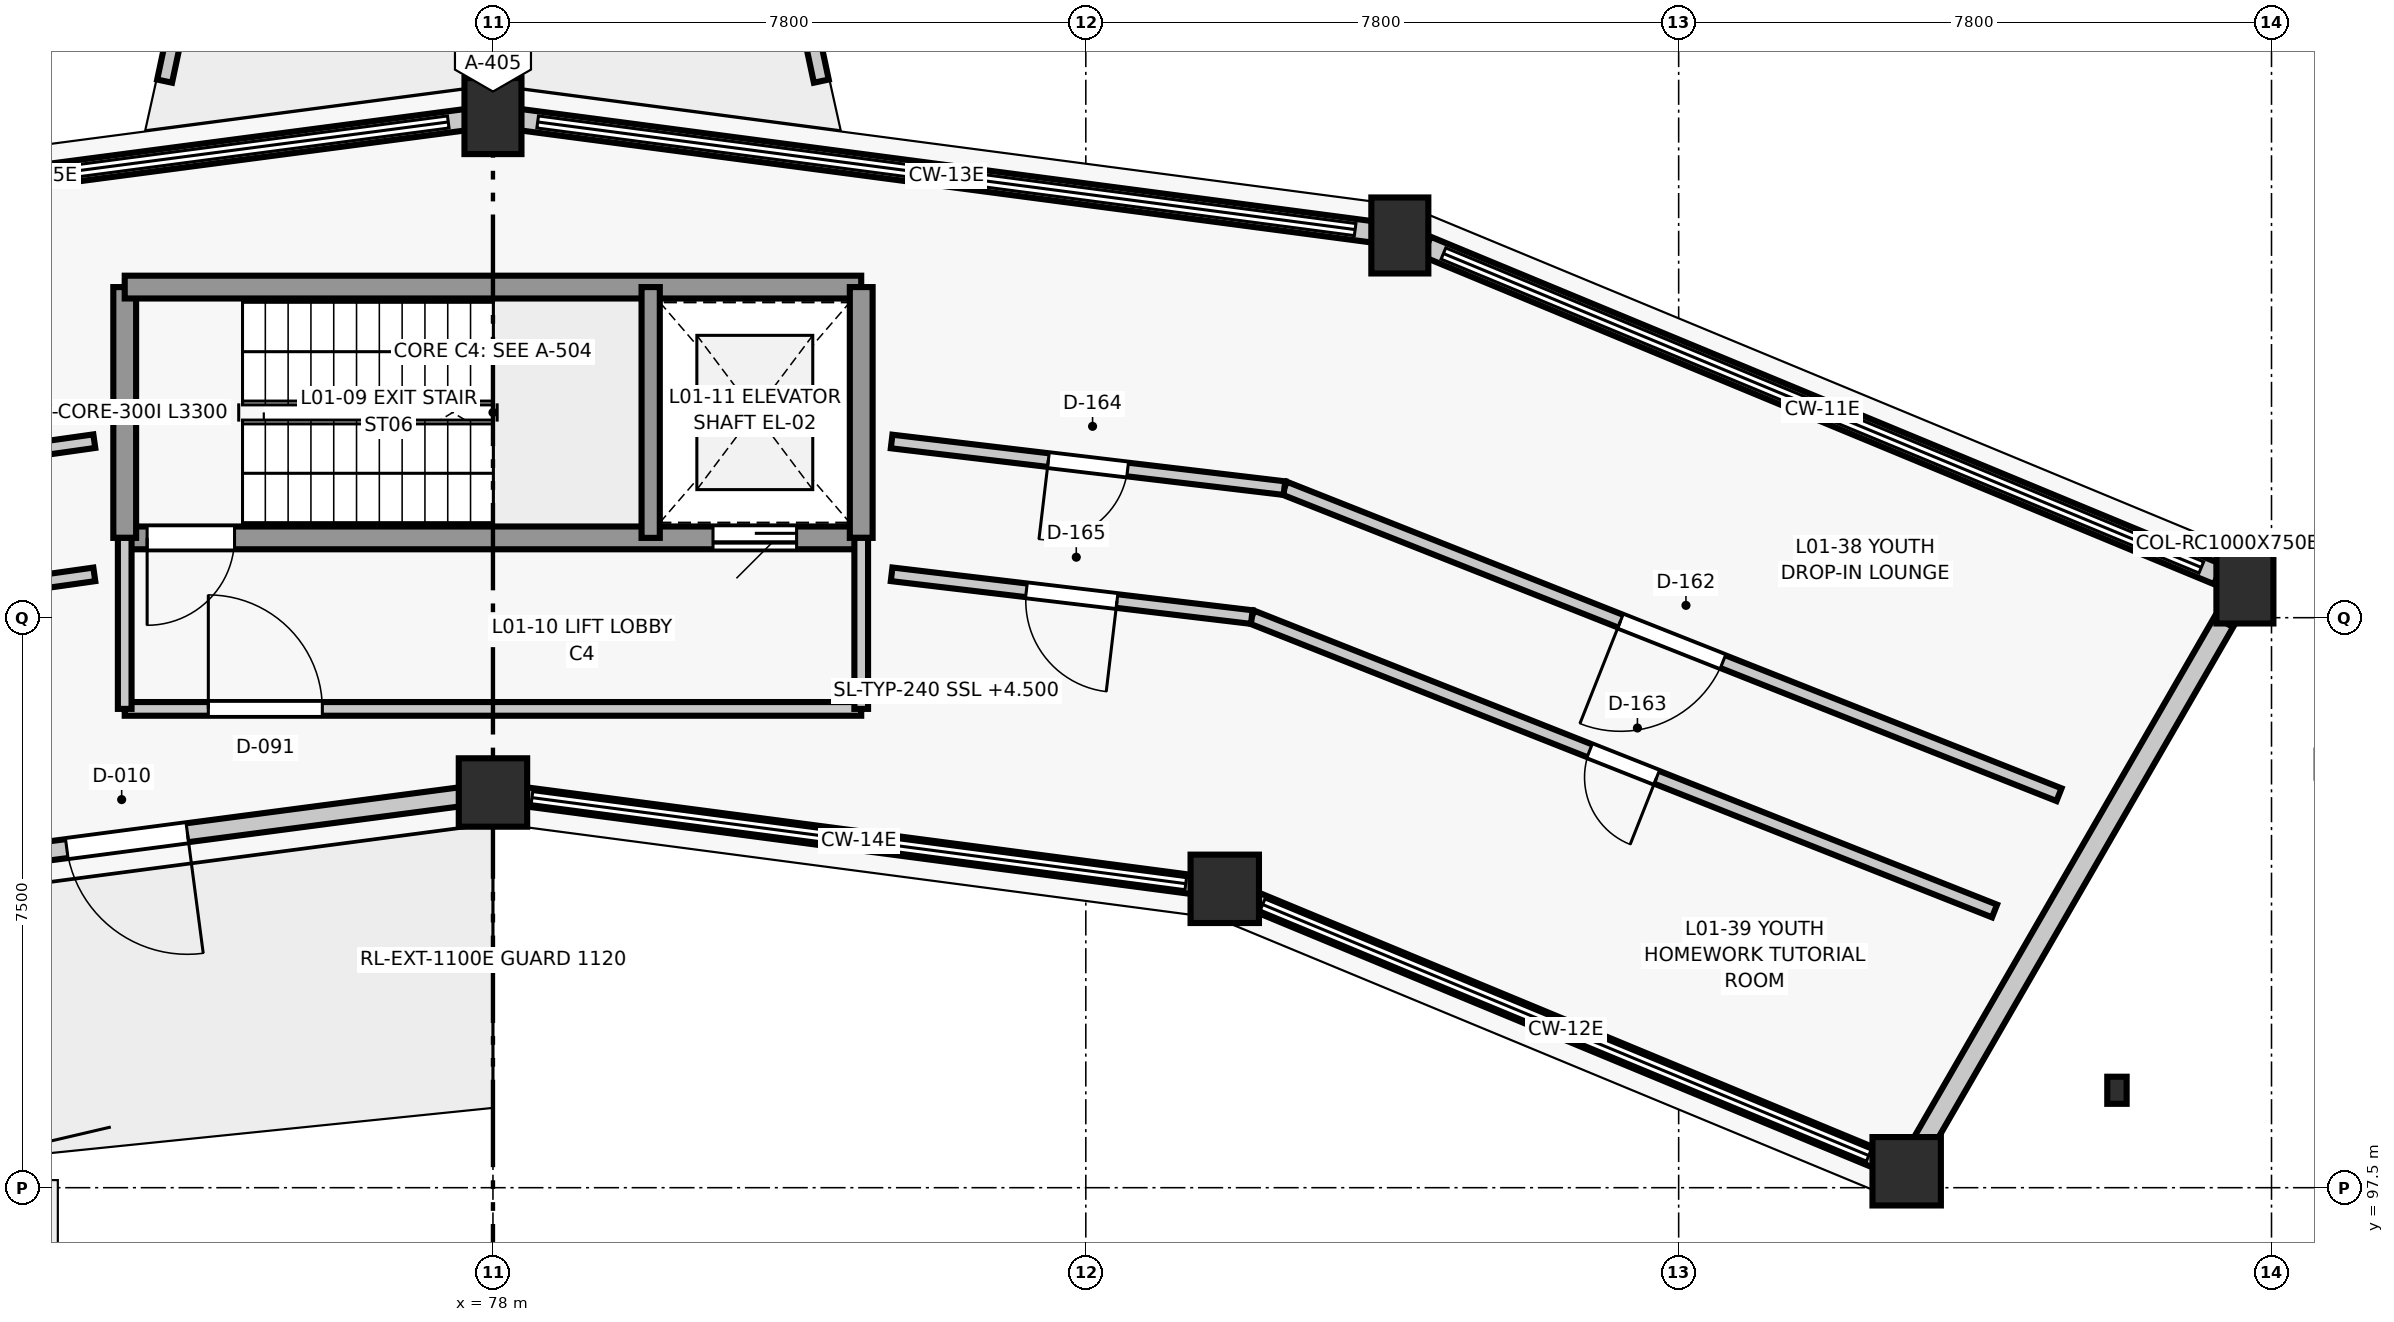
"""IFC4 building model, lengths in metres.
Left out: names, types, materials, properties, quantities, classifications, styles, units other than length and angle.
Written with IfcOpenShell. Run it as: python <this file> out.ifc"""

import sys

from ifc_helpers import new_model, si_unit, direction, frame, frame_2d, origin, origin_2d, place, context, subcontext, project, spatial, rectangle, circle, i_section, extrude, element, fill, save


model = new_model("IFC4")
c1 = context("Model", 3, precision=1e-05, world=origin(), true_north=direction((0.0, 1.0)))
c2 = subcontext(c1, "Body", "Model", "MODEL_VIEW")
j1 = project(units=[si_unit("LENGTHUNIT", "METRE"), si_unit("PLANEANGLEUNIT", "RADIAN")], contexts=[c1])
p1 = place(None, origin())
s1 = spatial("IfcSite", under=j1, at=p1, CompositionType="ELEMENT")
p2 = place(p1, origin())
s2 = spatial("IfcBuilding", under=s1, at=p2, CompositionType="ELEMENT")
p3 = place(p2, frame((0.0, 0.0, 4.5)))
s3 = spatial("IfcBuildingStorey", under=s2, at=p3, CompositionType="ELEMENT", Elevation=4.5)
for number, where, z_axis, x_axis in (
    (1, (96.6, 97.716, 0.0), (0.0, 0.0, 1.0), (1.0, 0.0, 0.0)),
    (2, (87.628, 101.432, 0.0), (0.0, 0.0, 1.0), (1.0, 0.0, 0.0)),
    (3, (78.0, 102.7, 0.0), (0.0, 0.0, 1.0), (1.0, 0.0, 0.0)),
):
    element("IfcColumn", number, at=place(p3, frame(where, z_axis=z_axis, x_axis=x_axis)), inside=s3, PredefinedType="COLUMN", context=c2, shape_type="SweptSolid", body=[
        extrude(circle(Radius=0.45, at=origin_2d()), origin(), (0.0, 0.0, 1.0), 4.2),
    ])
for number, where, z_axis, x_axis in (
    (4, (101.05, 105.424, 0.0), (0.0, 0.0, 1.0), (1.0, 0.0, 0.0)),
    (5, (89.932, 110.029, 0.0), (0.0, 0.0, 1.0), (1.0, 0.0, 0.0)),
    (6, (78.0, 111.6, 0.0), (0.0, 0.0, 1.0), (1.0, 0.0, 0.0)),
):
    element("IfcColumn", number, at=place(p3, frame(where, z_axis=z_axis, x_axis=x_axis)), inside=s3, PredefinedType="COLUMN", context=c2, shape_type="SweptSolid", body=[
        extrude(rectangle(XDim=0.75, YDim=1.0, at=origin_2d()), origin(), (0.0, 0.0, 1.0), 4.2),
    ])
p4 = place(p3, frame((99.366, 98.782, 0.0), z_axis=(0.0, 0.0, 1.0), x_axis=(1.0, 0.0, 0.0)))
e7 = element("IfcColumn", 7, at=p4, inside=s3, PredefinedType="COLUMN", context=c2, shape_type="SweptSolid", body=[
    extrude(i_section(OverallWidth=0.255, OverallDepth=0.357, WebThickness=0.01, FlangeThickness=0.018, FilletRadius=0.015, at=origin_2d()), origin(), (0.0, 0.0, 1.0), 3.35),
])
p5 = place(p3, frame((90.283, 109.883, 0.0), z_axis=(0.0, 0.0, 1.0), x_axis=(0.923883530636, -0.382673779896, 0.0)))
e8 = element("IfcWall", 8, at=p5, inside=s3, PredefinedType="STANDARD", context=c2, shape_type="SweptSolid", body=[
    extrude(rectangle(XDim=11.272, YDim=0.28, at=frame_2d((5.636, 0.0))), origin(), (0.0, 0.0, 1.0), 0.82),
])
p6 = place(p3, frame((96.323, 97.831, 0.0), z_axis=(0.0, 0.0, 1.0), x_axis=(-0.923880324771, 0.382681519675, 0.0)))
e9 = element("IfcWall", 9, at=p6, inside=s3, PredefinedType="STANDARD", context=c2, shape_type="SweptSolid", body=[
    extrude(rectangle(XDim=9.112, YDim=0.25, at=frame_2d((4.556, 0.0))), origin(), (0.0, 0.0, 1.0), 0.82),
])
p7 = place(p3, frame((78.35, 111.554, 0.0), z_axis=(0.0, 0.0, 1.0), x_axis=(0.991443215359, -0.130538694334, 0.0)))
e10 = element("IfcWall", 10, at=p7, inside=s3, PredefinedType="STANDARD", context=c2, shape_type="SweptSolid", body=[
    extrude(rectangle(XDim=11.328, YDim=0.28, at=frame_2d((5.664, 0.0))), origin(), (0.0, 0.0, 1.0), 0.82),
])
p8 = place(p3, frame((87.353, 101.469, 0.0), z_axis=(0.0, 0.0, 1.0), x_axis=(-0.991441766434, 0.130549698469, 0.0)))
e11 = element("IfcWall", 11, at=p8, inside=s3, PredefinedType="STANDARD", context=c2, shape_type="SweptSolid", body=[
    extrude(rectangle(XDim=9.156, YDim=0.25, at=frame_2d((4.578, 0.0))), origin(), (0.0, 0.0, 1.0), 0.82),
])
p9 = place(p3, frame((66.419, 110.075, 0.0), z_axis=(0.0, 0.0, 1.0), x_axis=(0.991443215359, 0.130538694334, 0.0)))
e12 = element("IfcWall", 12, at=p9, inside=s3, PredefinedType="STANDARD", context=c2, shape_type="SweptSolid", body=[
    extrude(rectangle(XDim=11.328, YDim=0.28, at=frame_2d((5.664, 0.0))), origin(), (0.0, 0.0, 1.0), 0.82),
])
p10 = place(p3, frame((77.725, 102.664, 0.0), z_axis=(0.0, 0.0, 1.0), x_axis=(-0.991441766434, -0.130549698469, 0.0)))
e13 = element("IfcWall", 13, at=p10, inside=s3, PredefinedType="STANDARD", context=c2, shape_type="SweptSolid", body=[
    extrude(rectangle(XDim=9.156, YDim=0.25, at=frame_2d((4.578, 0.0))), origin(), (0.0, 0.0, 1.0), 3.149),
])
p11 = place(p10, frame((3.778, 0.0, 0.0)))
e14 = element("IfcOpeningElement", 14, at=p11, cuts=e13, PredefinedType="OPENING", context=c2, shape_type="SweptSolid", body=[
    extrude(rectangle(XDim=1.6, YDim=2.2, at=frame_2d((0.8, 1.1))), frame((0.0, 0.135, 0.0), z_axis=(0.0, -1.0, 0.0), x_axis=(1.0, 0.0, 0.0)), (0.0, 0.0, 1.0), 0.27),
])
p12 = place(p3, frame((100.774, 104.946, 0.0), z_axis=(0.0, 0.0, 1.0), x_axis=(-0.499969958057, -0.866042747813, 0.0)))
e15 = element("IfcWall", 15, at=p12, inside=s3, PredefinedType="STANDARD", context=c2, shape_type="SweptSolid", body=[
    extrude(rectangle(XDim=8.026, YDim=0.28, at=frame_2d((4.013, 0.0))), origin(), (0.0, 0.0, 1.0), 3.217),
])
for number, where, z_axis, x_axis in (
    (16, (73.68, 112.06, 0.0), (0.0, 0.0, 1.0), (0.208, 0.978, 0.0)),
    (17, (82.12, 113.0, 0.0), (0.0, 0.0, 1.0), (0.208, -0.978, 0.0)),
):
    element("IfcWall", number, at=place(p3, frame(where, z_axis=z_axis, x_axis=x_axis)), inside=s3, PredefinedType="PARAPET", context=c2, shape_type="SweptSolid", body=[
        extrude(rectangle(XDim=0.961, YDim=0.2, at=frame_2d((0.48, 0.0))), origin(), (0.0, 0.0, 1.0), 1.12),
    ])
p13 = place(p3, frame((82.845, 106.05, 0.0), z_axis=(0.0, 0.0, 1.0), x_axis=(-1.0, 0.0, 0.0)))
e18 = element("IfcWall", 18, at=p13, inside=s3, PredefinedType="SHEAR", context=c2, shape_type="SweptSolid", body=[
    extrude(rectangle(XDim=9.69, YDim=0.3, at=frame_2d((4.845, 0.0))), origin(), (0.0, 0.0, 1.0), 4.2),
])
p14 = place(p13, frame((8.245, 0.0, 0.0)))
e19 = element("IfcOpeningElement", 19, at=p14, cuts=e18, PredefinedType="OPENING", context=c2, shape_type="SweptSolid", body=[
    extrude(rectangle(XDim=1.15, YDim=2.15, at=frame_2d((0.575, 1.075))), frame((0.0, 0.16, 0.0), z_axis=(0.0, -1.0, 0.0), x_axis=(1.0, 0.0, 0.0)), (0.0, 0.0, 1.0), 0.32),
])
p15 = place(p13, frame((0.85, 0.0, 0.0)))
e20 = element("IfcOpeningElement", 20, at=p15, cuts=e18, PredefinedType="OPENING", context=c2, shape_type="SweptSolid", body=[
    extrude(rectangle(XDim=1.1, YDim=2.15, at=frame_2d((0.55, 1.075))), frame((0.0, 0.16, 0.0), z_axis=(0.0, -1.0, 0.0), x_axis=(1.0, 0.0, 0.0)), (0.0, 0.0, 1.0), 0.32),
])
p16 = place(p3, frame((73.155, 106.05, 0.0), z_axis=(0.0, 0.0, 1.0), x_axis=(0.0, 1.0, 0.0)))
e21 = element("IfcWall", 21, at=p16, inside=s3, PredefinedType="SHEAR", context=c2, shape_type="SweptSolid", body=[
    extrude(rectangle(XDim=3.3, YDim=0.3, at=frame_2d((1.65, 0.0))), origin(), (0.0, 0.0, 1.0), 4.2),
])
p17 = place(p3, frame((73.155, 109.35, 0.0), z_axis=(0.0, 0.0, 1.0), x_axis=(1.0, 0.0, 0.0)))
e22 = element("IfcWall", 22, at=p17, inside=s3, PredefinedType="SHEAR", context=c2, shape_type="SweptSolid", body=[
    extrude(rectangle(XDim=9.69, YDim=0.3, at=frame_2d((4.845, 0.0))), origin(), (0.0, 0.0, 1.0), 4.2),
])
p18 = place(p3, frame((82.845, 109.35, 0.0), z_axis=(0.0, 0.0, 1.0), x_axis=(0.0, -1.0, 0.0)))
e23 = element("IfcWall", 23, at=p18, inside=s3, PredefinedType="SHEAR", context=c2, shape_type="SweptSolid", body=[
    extrude(rectangle(XDim=3.3, YDim=0.3, at=frame_2d((1.65, 0.0))), origin(), (0.0, 0.0, 1.0), 4.2),
])
p19 = place(p3, frame((80.075, 106.05, 0.0), z_axis=(0.0, 0.0, 1.0), x_axis=(0.0, 1.0, 0.0)))
e24 = element("IfcWall", 24, at=p19, inside=s3, PredefinedType="SHEAR", context=c2, shape_type="SweptSolid", body=[
    extrude(rectangle(XDim=3.3, YDim=0.24, at=frame_2d((1.65, 0.0))), origin(), (0.0, 0.0, 1.0), 4.2),
])
p20 = place(p3, frame((73.155, 103.8, 0.0), z_axis=(0.0, 0.0, 1.0), x_axis=(1.0, 0.0, 0.0)))
e25 = element("IfcWall", 25, at=p20, inside=s3, PredefinedType="PARTITIONING", context=c2, shape_type="SweptSolid", body=[
    extrude(rectangle(XDim=9.69, YDim=0.18, at=frame_2d((4.845, 0.0))), origin(), (0.0, 0.0, 1.0), 3.855),
])
p21 = place(p20, frame((1.1, 0.0, 0.0)))
e26 = element("IfcOpeningElement", 26, at=p21, cuts=e25, PredefinedType="OPENING", context=c2, shape_type="SweptSolid", body=[
    extrude(rectangle(XDim=1.5, YDim=2.15, at=frame_2d((0.75, 1.075))), frame((0.0, 0.1, 0.0), z_axis=(0.0, -1.0, 0.0), x_axis=(1.0, 0.0, 0.0)), (0.0, 0.0, 1.0), 0.2),
])
for number, where, z_axis, x_axis in (
    (27, (73.155, 106.05, 0.0), (0.0, 0.0, 1.0), (0.0, -1.0, 0.0)),
    (28, (82.845, 106.05, 0.0), (0.0, 0.0, 1.0), (0.0, -1.0, 0.0)),
):
    element("IfcWall", number, at=place(p3, frame(where, z_axis=z_axis, x_axis=x_axis)), inside=s3, PredefinedType="PARTITIONING", context=c2, shape_type="SweptSolid", body=[
        extrude(rectangle(XDim=2.25, YDim=0.18, at=frame_2d((1.125, 0.0))), origin(), (0.0, 0.0, 1.0), 3.855),
    ])
p22 = place(p3, frame((98.604, 102.671, 0.0), z_axis=(0.0, 0.0, 1.0), x_axis=(-0.92984059227, 0.367962597238, 0.0)))
e29 = element("IfcWall", 29, at=p22, inside=s3, PredefinedType="PARTITIONING", context=c2, shape_type="SweptSolid", body=[
    extrude(rectangle(XDim=10.961, YDim=0.18, at=frame_2d((5.48, 0.0))), origin(), (0.0, 0.0, 1.0), 3.855),
])
p23 = place(p22, frame((4.756, 0.0, 0.0)))
e30 = element("IfcOpeningElement", 30, at=p23, cuts=e29, PredefinedType="OPENING", context=c2, shape_type="SweptSolid", body=[
    extrude(rectangle(XDim=1.45, YDim=2.2, at=frame_2d((0.725, 1.1))), frame((0.0, 0.1, 0.0), z_axis=(0.0, -1.0, 0.0), x_axis=(1.0, 0.0, 0.0)), (0.0, 0.0, 1.0), 0.2),
])
p24 = place(p3, frame((97.756, 101.141, 0.0), z_axis=(0.0, 0.0, 1.0), x_axis=(-0.92984171937, 0.367959749046, 0.0)))
e31 = element("IfcWall", 31, at=p24, inside=s3, PredefinedType="PARTITIONING", context=c2, shape_type="SweptSolid", body=[
    extrude(rectangle(XDim=10.51, YDim=0.18, at=frame_2d((5.255, 0.0))), origin(), (0.0, 0.0, 1.0), 3.855),
])
p25 = place(p24, frame((4.78, 0.0, 0.0)))
e32 = element("IfcOpeningElement", 32, at=p25, cuts=e31, PredefinedType="OPENING", context=c2, shape_type="SweptSolid", body=[
    extrude(rectangle(XDim=0.95, YDim=2.1, at=frame_2d((0.475, 1.05))), frame((0.0, 0.1, 0.0), z_axis=(0.0, -1.0, 0.0), x_axis=(1.0, 0.0, 0.0)), (0.0, 0.0, 1.0), 0.2),
])
p26 = place(p3, frame((88.413, 106.705, 0.0), z_axis=(0.0, 0.0, 1.0), x_axis=(-0.993019970185, 0.117946338706, 0.0)))
e33 = element("IfcWall", 33, at=p26, inside=s3, PredefinedType="PARTITIONING", context=c2, shape_type="SweptSolid", body=[
    extrude(rectangle(XDim=5.204, YDim=0.18, at=frame_2d((2.602, 0.0))), origin(), (0.0, 0.0, 1.0), 3.855),
])
p27 = place(p26, frame((2.077, 0.0, 0.0)))
e34 = element("IfcOpeningElement", 34, at=p27, cuts=e33, PredefinedType="OPENING", context=c2, shape_type="SweptSolid", body=[
    extrude(rectangle(XDim=1.05, YDim=2.1, at=frame_2d((0.525, 1.05))), frame((0.0, 0.1, 0.0), z_axis=(0.0, -1.0, 0.0), x_axis=(1.0, 0.0, 0.0)), (0.0, 0.0, 1.0), 0.2),
])
p28 = place(p3, frame((87.984, 105.008, 0.0), z_axis=(0.0, 0.0, 1.0), x_axis=(-0.993021837472, 0.117930616486, 0.0)))
e35 = element("IfcWall", 35, at=p28, inside=s3, PredefinedType="PARTITIONING", context=c2, shape_type="SweptSolid", body=[
    extrude(rectangle(XDim=4.772, YDim=0.18, at=frame_2d((2.386, 0.0))), origin(), (0.0, 0.0, 1.0), 3.855),
])
p29 = place(p28, frame((1.786, 0.0, 0.0)))
e36 = element("IfcOpeningElement", 36, at=p29, cuts=e35, PredefinedType="OPENING", context=c2, shape_type="SweptSolid", body=[
    extrude(rectangle(XDim=1.2, YDim=2.15, at=frame_2d((0.6, 1.075))), frame((0.0, 0.1, 0.0), z_axis=(0.0, -1.0, 0.0), x_axis=(1.0, 0.0, 0.0)), (0.0, 0.0, 1.0), 0.2),
])
p30 = place(p3, frame((72.755, 107.323, 0.0), z_axis=(0.0, 0.0, 1.0), x_axis=(-0.990158330555, -0.139951707499, 0.0)))
e37 = element("IfcWall", 37, at=p30, inside=s3, PredefinedType="PARTITIONING", context=c2, shape_type="SweptSolid", body=[
    extrude(rectangle(XDim=6.141, YDim=0.18, at=frame_2d((3.07, 0.0))), origin(), (0.0, 0.0, 1.0), 3.855),
])
p31 = place(p30, frame((2.32, 0.0, 0.0)))
e38 = element("IfcOpeningElement", 38, at=p31, cuts=e37, PredefinedType="OPENING", context=c2, shape_type="SweptSolid", body=[
    extrude(rectangle(XDim=1.5, YDim=2.15, at=frame_2d((0.75, 1.075))), frame((0.0, 0.1, 0.0), z_axis=(0.0, -1.0, 0.0), x_axis=(1.0, 0.0, 0.0)), (0.0, 0.0, 1.0), 0.2),
])
p32 = place(p3, frame((72.755, 105.57, 0.0), z_axis=(0.0, 0.0, 1.0), x_axis=(-0.990158541411, -0.13995021569, 0.0)))
e39 = element("IfcWall", 39, at=p32, inside=s3, PredefinedType="PARTITIONING", context=c2, shape_type="SweptSolid", body=[
    extrude(rectangle(XDim=5.67, YDim=0.18, at=frame_2d((2.835, 0.0))), origin(), (0.0, 0.0, 1.0), 3.855),
])
p33 = place(p32, frame((2.11, 0.0, 0.0)))
e40 = element("IfcOpeningElement", 40, at=p33, cuts=e39, PredefinedType="OPENING", context=c2, shape_type="SweptSolid", body=[
    extrude(rectangle(XDim=1.45, YDim=2.2, at=frame_2d((0.725, 1.1))), frame((0.0, 0.1, 0.0), z_axis=(0.0, -1.0, 0.0), x_axis=(1.0, 0.0, 0.0)), (0.0, 0.0, 1.0), 0.2),
])
p34 = place(p11, origin())
e41 = element("IfcDoor", 41, at=p34, inside=s3, OperationType="SINGLE_SWING_LEFT", PredefinedType="DOOR", context=c2, shape_type="SweptSolid", body=[
    extrude(rectangle(XDim=1.6, YDim=2.2, at=frame_2d((0.8, 1.1))), frame((0.0, 0.025, 0.0), z_axis=(0.0, -1.0, 0.0), x_axis=(1.0, 0.0, 0.0)), (0.0, 0.0, 1.0), 0.05),
])
fill(e14, e41)
p35 = place(p14, origin())
e42 = element("IfcDoor", 42, at=p35, inside=s3, OperationType="SINGLE_SWING_RIGHT", PredefinedType="DOOR", context=c2, shape_type="SweptSolid", body=[
    extrude(rectangle(XDim=1.15, YDim=2.15, at=frame_2d((0.575, 1.075))), frame((0.0, 0.025, 0.0), z_axis=(0.0, -1.0, 0.0), x_axis=(1.0, 0.0, 0.0)), (0.0, 0.0, 1.0), 0.05),
])
fill(e19, e42)
p36 = place(p15, origin())
e43 = element("IfcDoor", 43, at=p36, inside=s3, OperationType="SLIDING_TO_LEFT", PredefinedType="DOOR", context=c2, shape_type="SweptSolid", body=[
    extrude(rectangle(XDim=1.1, YDim=2.15, at=frame_2d((0.55, 1.075))), frame((0.0, 0.025, 0.0), z_axis=(0.0, -1.0, 0.0), x_axis=(1.0, 0.0, 0.0)), (0.0, 0.0, 1.0), 0.05),
])
fill(e20, e43)
p37 = place(p21, origin())
e44 = element("IfcDoor", 44, at=p37, inside=s3, OperationType="SINGLE_SWING_LEFT", PredefinedType="DOOR", context=c2, shape_type="SweptSolid", body=[
    extrude(rectangle(XDim=1.5, YDim=2.15, at=frame_2d((0.75, 1.075))), frame((0.0, 0.025, 0.0), z_axis=(0.0, -1.0, 0.0), x_axis=(1.0, 0.0, 0.0)), (0.0, 0.0, 1.0), 0.05),
])
fill(e26, e44)
p38 = place(p23, origin())
e45 = element("IfcDoor", 45, at=p38, inside=s3, OperationType="SINGLE_SWING_RIGHT", PredefinedType="DOOR", context=c2, shape_type="SweptSolid", body=[
    extrude(rectangle(XDim=1.45, YDim=2.2, at=frame_2d((0.725, 1.1))), frame((0.0, 0.025, 0.0), z_axis=(0.0, -1.0, 0.0), x_axis=(1.0, 0.0, 0.0)), (0.0, 0.0, 1.0), 0.05),
])
fill(e30, e45)
p39 = place(p25, origin())
e46 = element("IfcDoor", 46, at=p39, inside=s3, OperationType="SINGLE_SWING_LEFT", PredefinedType="DOOR", context=c2, shape_type="SweptSolid", body=[
    extrude(rectangle(XDim=0.95, YDim=2.1, at=frame_2d((0.475, 1.05))), frame((0.0, 0.025, 0.0), z_axis=(0.0, -1.0, 0.0), x_axis=(1.0, 0.0, 0.0)), (0.0, 0.0, 1.0), 0.05),
])
fill(e32, e46)
p40 = place(p27, origin())
e47 = element("IfcDoor", 47, at=p40, inside=s3, OperationType="SINGLE_SWING_RIGHT", PredefinedType="DOOR", context=c2, shape_type="SweptSolid", body=[
    extrude(rectangle(XDim=1.05, YDim=2.1, at=frame_2d((0.525, 1.05))), frame((0.0, 0.025, 0.0), z_axis=(0.0, -1.0, 0.0), x_axis=(1.0, 0.0, 0.0)), (0.0, 0.0, 1.0), 0.05),
])
fill(e34, e47)
p41 = place(p29, origin())
e48 = element("IfcDoor", 48, at=p41, inside=s3, OperationType="SINGLE_SWING_LEFT", PredefinedType="DOOR", context=c2, shape_type="SweptSolid", body=[
    extrude(rectangle(XDim=1.2, YDim=2.15, at=frame_2d((0.6, 1.075))), frame((0.0, 0.025, 0.0), z_axis=(0.0, -1.0, 0.0), x_axis=(1.0, 0.0, 0.0)), (0.0, 0.0, 1.0), 0.05),
])
fill(e36, e48)
save(model, sys.argv[1])
